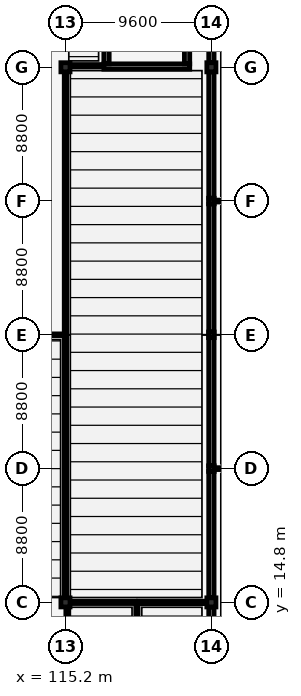
"""IFC4 building model, lengths in metres.
Left out: names, types, materials, properties, quantities, classifications, styles, units other than length and angle.
Written with IfcOpenShell. Run it as: python <this file> out.ifc"""

import sys

from ifc_helpers import new_model, si_unit, direction, frame, frame_2d, origin, origin_2d, place, context, subcontext, project, spatial, rectangle, i_section, extrude, element, fill, save


model = new_model("IFC4")
c1 = context("Model", 3, precision=1e-05, world=origin(), true_north=direction((0.0, 1.0)))
c2 = subcontext(c1, "Body", "Model", "MODEL_VIEW")
j1 = project(units=[si_unit("LENGTHUNIT", "METRE"), si_unit("PLANEANGLEUNIT", "RADIAN")], contexts=[c1])
p1 = place(None, origin())
s1 = spatial("IfcSite", under=j1, at=p1, CompositionType="ELEMENT")
p2 = place(p1, origin())
s2 = spatial("IfcBuilding", under=s1, at=p2, CompositionType="ELEMENT")
p3 = place(p2, origin())
s3 = spatial("IfcBuildingStorey", under=s2, at=p3, CompositionType="ELEMENT", Elevation=0.0)
for number, where, z_axis, x_axis in (
    (1, (115.2, 14.8, 0.0), (0.0, 0.0, 1.0), (1.0, 0.0, 0.0)),
    (2, (115.2, 50.0, 0.0), (0.0, 0.0, 1.0), (1.0, 0.0, 0.0)),
    (3, (124.8, 14.8, 0.0), (0.0, 0.0, 1.0), (1.0, 0.0, 0.0)),
):
    element("IfcColumn", number, at=place(p3, frame(where, z_axis=z_axis, x_axis=x_axis)), inside=s3, PredefinedType="COLUMN", context=c2, shape_type="SweptSolid", body=[
        extrude(rectangle(XDim=0.6, YDim=0.6, at=origin_2d()), origin(), (0.0, 0.0, 1.0), 4.8),
    ])
for number, where, z_axis, x_axis in (
    (4, (124.8, 23.6, 0.0), (0.0, 0.0, 1.0), (1.0, 0.0, 0.0)),
    (5, (124.8, 32.4, 0.0), (0.0, 0.0, 1.0), (1.0, 0.0, 0.0)),
    (6, (124.8, 41.2, 0.0), (0.0, 0.0, 1.0), (1.0, 0.0, 0.0)),
):
    element("IfcColumn", number, at=place(p3, frame(where, z_axis=z_axis, x_axis=x_axis)), inside=s3, PredefinedType="COLUMN", context=c2, shape_type="SweptSolid", body=[
        extrude(i_section(OverallWidth=0.368, OverallDepth=0.368, WebThickness=0.015, FlangeThickness=0.024, FilletRadius=0.025, at=origin_2d()), origin(), (0.0, 0.0, 1.0), 4.8),
    ])
p4 = place(p3, frame((124.8, 50.0, 0.0), z_axis=(0.0, 0.0, 1.0), x_axis=(1.0, 0.0, 0.0)))
e7 = element("IfcColumn", 7, at=p4, inside=s3, PredefinedType="COLUMN", context=c2, shape_type="SweptSolid", body=[
    extrude(rectangle(XDim=0.6, YDim=0.6, at=origin_2d()), origin(), (0.0, 0.0, 1.0), 4.8),
])
p5 = place(p3, frame((124.8, 6.4, 0.0), z_axis=(0.0, 0.0, 1.0), x_axis=(0.0, 1.0, 0.0)))
e8 = element("IfcWall", 8, at=p5, inside=s3, PredefinedType="SOLIDWALL", context=c2, shape_type="SweptSolid", body=[
    extrude(rectangle(XDim=8.1, YDim=0.35, at=frame_2d((4.05, 0.0))), origin(), (0.0, 0.0, 1.0), 4.1),
])
p6 = place(p3, frame((124.8, 15.1, 0.0), z_axis=(0.0, 0.0, 1.0), x_axis=(0.0, 1.0, 0.0)))
e9 = element("IfcWall", 9, at=p6, inside=s3, PredefinedType="SOLIDWALL", context=c2, shape_type="SweptSolid", body=[
    extrude(rectangle(XDim=8.316, YDim=0.35, at=frame_2d((4.158, 0.0))), origin(), (0.0, 0.0, 1.0), 4.1),
])
p7 = place(p6, frame((3.0, 0.0, 0.0)))
e10 = element("IfcOpeningElement", 10, at=p7, cuts=e9, PredefinedType="OPENING", context=c2, shape_type="SweptSolid", body=[
    extrude(rectangle(XDim=1.8, YDim=2.4, at=frame_2d((0.9, 1.2))), frame((0.0, 0.185, 0.0), z_axis=(0.0, -1.0, 0.0), x_axis=(1.0, 0.0, 0.0)), (0.0, 0.0, 1.0), 0.37),
])
p8 = place(p3, frame((124.8, 23.784, 0.0), z_axis=(0.0, 0.0, 1.0), x_axis=(0.0, 1.0, 0.0)))
e11 = element("IfcWall", 11, at=p8, inside=s3, PredefinedType="SOLIDWALL", context=c2, shape_type="SweptSolid", body=[
    extrude(rectangle(XDim=8.432, YDim=0.35, at=frame_2d((4.216, 0.0))), origin(), (0.0, 0.0, 1.0), 4.1),
])
p9 = place(p8, frame((3.0, 0.0, 0.0)))
e12 = element("IfcOpeningElement", 12, at=p9, cuts=e11, PredefinedType="OPENING", context=c2, shape_type="SweptSolid", body=[
    extrude(rectangle(XDim=1.76, YDim=2.37, at=frame_2d((0.88, 1.185))), frame((0.0, 0.185, 0.0), z_axis=(0.0, -1.0, 0.0), x_axis=(1.0, 0.0, 0.0)), (0.0, 0.0, 1.0), 0.37),
])
p10 = place(p3, frame((124.8, 32.584, 0.0), z_axis=(0.0, 0.0, 1.0), x_axis=(0.0, 1.0, 0.0)))
e13 = element("IfcWall", 13, at=p10, inside=s3, PredefinedType="SOLIDWALL", context=c2, shape_type="SweptSolid", body=[
    extrude(rectangle(XDim=8.432, YDim=0.35, at=frame_2d((4.216, 0.0))), origin(), (0.0, 0.0, 1.0), 4.1),
])
p11 = place(p10, frame((3.0, 0.0, 0.0)))
e14 = element("IfcOpeningElement", 14, at=p11, cuts=e13, PredefinedType="OPENING", context=c2, shape_type="SweptSolid", body=[
    extrude(rectangle(XDim=1.72, YDim=2.34, at=frame_2d((0.86, 1.17))), frame((0.0, 0.185, 0.0), z_axis=(0.0, -1.0, 0.0), x_axis=(1.0, 0.0, 0.0)), (0.0, 0.0, 1.0), 0.37),
])
p12 = place(p3, frame((124.8, 41.384, 0.0), z_axis=(0.0, 0.0, 1.0), x_axis=(0.0, 1.0, 0.0)))
e15 = element("IfcWall", 15, at=p12, inside=s3, PredefinedType="SOLIDWALL", context=c2, shape_type="SweptSolid", body=[
    extrude(rectangle(XDim=8.316, YDim=0.35, at=frame_2d((4.158, 0.0))), origin(), (0.0, 0.0, 1.0), 4.1),
])
p13 = place(p12, frame((3.0, 0.0, 0.0)))
e16 = element("IfcOpeningElement", 16, at=p13, cuts=e15, PredefinedType="OPENING", context=c2, shape_type="SweptSolid", body=[
    extrude(rectangle(XDim=1.68, YDim=2.31, at=frame_2d((0.84, 1.155))), frame((0.0, 0.185, 0.0), z_axis=(0.0, -1.0, 0.0), x_axis=(1.0, 0.0, 0.0)), (0.0, 0.0, 1.0), 0.37),
])
p14 = place(p3, frame((124.8, 50.3, 0.0), z_axis=(0.0, 0.0, 1.0), x_axis=(0.0, 1.0, 0.0)))
e17 = element("IfcWall", 17, at=p14, inside=s3, PredefinedType="SOLIDWALL", context=c2, shape_type="SweptSolid", body=[
    extrude(rectangle(XDim=8.1, YDim=0.35, at=frame_2d((4.05, 0.0))), origin(), (0.0, 0.0, 1.0), 4.1),
])
p15 = place(p3, frame((123.375, 50.05, 0.0), z_axis=(0.0, 0.0, 1.0), x_axis=(-1.0, 0.0, 0.0)))
e18 = element("IfcWall", 18, at=p15, inside=s3, PredefinedType="SHEAR", context=c2, shape_type="SweptSolid", body=[
    extrude(rectangle(XDim=5.65, YDim=0.35, at=frame_2d((2.825, 0.0))), origin(), (0.0, 0.0, 1.0), 4.55),
])
p16 = place(p3, frame((117.9, 50.225, 0.0), z_axis=(0.0, 0.0, 1.0), x_axis=(0.0, 1.0, 0.0)))
e19 = element("IfcWall", 19, at=p16, inside=s3, PredefinedType="SHEAR", context=c2, shape_type="SweptSolid", body=[
    extrude(rectangle(XDim=7.95, YDim=0.35, at=frame_2d((3.975, 0.0))), origin(), (0.0, 0.0, 1.0), 4.55),
])
p17 = place(p16, frame((0.22, 0.0, 0.0)))
e20 = element("IfcOpeningElement", 20, at=p17, cuts=e19, PredefinedType="OPENING", context=c2, shape_type="SweptSolid", body=[
    extrude(rectangle(XDim=2.05, YDim=2.15, at=frame_2d((1.025, 1.075))), frame((0.0, 0.185, 0.0), z_axis=(0.0, -1.0, 0.0), x_axis=(1.0, 0.0, 0.0)), (0.0, 0.0, 1.0), 0.37),
])
p18 = place(p3, frame((123.2, 58.175, 0.0), z_axis=(0.0, 0.0, 1.0), x_axis=(0.0, -1.0, 0.0)))
e21 = element("IfcWall", 21, at=p18, inside=s3, PredefinedType="SHEAR", context=c2, shape_type="SweptSolid", body=[
    extrude(rectangle(XDim=7.95, YDim=0.35, at=frame_2d((3.975, 0.0))), origin(), (0.0, 0.0, 1.0), 4.55),
])
p19 = place(p3, frame((86.5, 32.4, 0.0), z_axis=(0.0, 0.0, 1.0), x_axis=(1.0, 0.0, 0.0)))
e22 = element("IfcWall", 22, at=p19, inside=s3, PredefinedType="PARTITIONING", context=c2, shape_type="SweptSolid", body=[
    extrude(rectangle(XDim=28.65, YDim=0.125, at=frame_2d((14.325, 0.0))), origin(), (0.0, 0.0, 1.0), 4.42),
])
p20 = place(p3, frame((115.2, 14.9, 0.0), z_axis=(0.0, 0.0, 1.0), x_axis=(0.0, 1.0, 0.0)))
e23 = element("IfcWall", 23, at=p20, inside=s3, PredefinedType="PARTITIONING", context=c2, shape_type="SweptSolid", body=[
    extrude(rectangle(XDim=17.4, YDim=0.16, at=frame_2d((8.7, 0.0))), origin(), (0.0, 0.0, 1.0), 4.42),
])
p21 = place(p20, frame((7.8, 0.0, 0.0)))
e24 = element("IfcOpeningElement", 24, at=p21, cuts=e23, PredefinedType="OPENING", context=c2, shape_type="SweptSolid", body=[
    extrude(rectangle(XDim=1.8, YDim=2.15, at=frame_2d((0.9, 1.075))), frame((0.0, 0.09, 0.0), z_axis=(0.0, -1.0, 0.0), x_axis=(1.0, 0.0, 0.0)), (0.0, 0.0, 1.0), 0.18),
])
p22 = place(p3, frame((115.2, 32.5, 0.0), z_axis=(0.0, 0.0, 1.0), x_axis=(0.0, 1.0, 0.0)))
e25 = element("IfcWall", 25, at=p22, inside=s3, PredefinedType="PARTITIONING", context=c2, shape_type="SweptSolid", body=[
    extrude(rectangle(XDim=17.45, YDim=0.16, at=frame_2d((8.725, 0.0))), origin(), (0.0, 0.0, 1.0), 4.42),
])
p23 = place(p22, frame((7.825, 0.0, 0.0)))
e26 = element("IfcOpeningElement", 26, at=p23, cuts=e25, PredefinedType="OPENING", context=c2, shape_type="SweptSolid", body=[
    extrude(rectangle(XDim=1.8, YDim=2.15, at=frame_2d((0.9, 1.075))), frame((0.0, 0.09, 0.0), z_axis=(0.0, -1.0, 0.0), x_axis=(1.0, 0.0, 0.0)), (0.0, 0.0, 1.0), 0.18),
])
p24 = place(p3, frame((115.15, 50.1, 0.0), z_axis=(0.0, 0.0, 1.0), x_axis=(1.0, 0.0, 0.0)))
e27 = element("IfcWall", 27, at=p24, inside=s3, PredefinedType="PARTITIONING", context=c2, shape_type="SweptSolid", body=[
    extrude(rectangle(XDim=2.45, YDim=0.16, at=frame_2d((1.225, 0.0))), origin(), (0.0, 0.0, 1.0), 3.835),
])
p25 = place(p24, frame((0.43, 0.0, 0.0)))
e28 = element("IfcOpeningElement", 28, at=p25, cuts=e27, PredefinedType="OPENING", context=c2, shape_type="SweptSolid", body=[
    extrude(rectangle(XDim=1.8, YDim=2.15, at=frame_2d((0.9, 1.075))), frame((0.0, 0.09, 0.0), z_axis=(0.0, -1.0, 0.0), x_axis=(1.0, 0.0, 0.0)), (0.0, 0.0, 1.0), 0.18),
])
p26 = place(p3, frame((115.15, 14.8, 0.0), z_axis=(0.0, 0.0, 1.0), x_axis=(1.0, 0.0, 0.0)))
e29 = element("IfcWall", 29, at=p26, inside=s3, PredefinedType="PARTITIONING", context=c2, shape_type="SweptSolid", body=[
    extrude(rectangle(XDim=4.65, YDim=0.15, at=frame_2d((2.325, 0.0))), origin(), (0.0, 0.0, 1.0), 3.835),
])
p27 = place(p26, frame((1.85, 0.0, 0.0)))
e30 = element("IfcOpeningElement", 30, at=p27, cuts=e29, PredefinedType="OPENING", context=c2, shape_type="SweptSolid", body=[
    extrude(rectangle(XDim=0.95, YDim=2.15, at=frame_2d((0.475, 1.075))), frame((0.0, 0.085, 0.0), z_axis=(0.0, -1.0, 0.0), x_axis=(1.0, 0.0, 0.0)), (0.0, 0.0, 1.0), 0.17),
])
p28 = place(p3, frame((120.0, 14.8, 0.0), z_axis=(0.0, 0.0, 1.0), x_axis=(1.0, 0.0, 0.0)))
e31 = element("IfcWall", 31, at=p28, inside=s3, PredefinedType="PARTITIONING", context=c2, shape_type="SweptSolid", body=[
    extrude(rectangle(XDim=4.75, YDim=0.16, at=frame_2d((2.375, 0.0))), origin(), (0.0, 0.0, 1.0), 3.835),
])
p29 = place(p28, frame((1.475, 0.0, 0.0)))
e32 = element("IfcOpeningElement", 32, at=p29, cuts=e31, PredefinedType="OPENING", context=c2, shape_type="SweptSolid", body=[
    extrude(rectangle(XDim=1.8, YDim=2.15, at=frame_2d((0.9, 1.075))), frame((0.0, 0.09, 0.0), z_axis=(0.0, -1.0, 0.0), x_axis=(1.0, 0.0, 0.0)), (0.0, 0.0, 1.0), 0.18),
])
p30 = place(p3, frame((119.9, 10.7, 0.0), z_axis=(0.0, 0.0, 1.0), x_axis=(0.0, 1.0, 0.0)))
e33 = element("IfcWall", 33, at=p30, inside=s3, PredefinedType="PARTITIONING", context=c2, shape_type="SweptSolid", body=[
    extrude(rectangle(XDim=4.0, YDim=0.15, at=frame_2d((2.0, 0.0))), origin(), (0.0, 0.0, 1.0), 4.42),
])
p31 = place(p30, frame((1.525, 0.0, 0.0)))
e34 = element("IfcOpeningElement", 34, at=p31, cuts=e33, PredefinedType="OPENING", context=c2, shape_type="SweptSolid", body=[
    extrude(rectangle(XDim=0.95, YDim=2.15, at=frame_2d((0.475, 1.075))), frame((0.0, 0.085, 0.0), z_axis=(0.0, -1.0, 0.0), x_axis=(1.0, 0.0, 0.0)), (0.0, 0.0, 1.0), 0.17),
])
for number, where, z_axis, x_axis in (
    (35, (124.75, 23.6, 0.0), (0.0, 0.0, 1.0), (1.0, 0.0, 0.0)),
    (36, (124.75, 41.2, 0.0), (0.0, 0.0, 1.0), (1.0, 0.0, 0.0)),
):
    element("IfcWall", number, at=place(p3, frame(where, z_axis=z_axis, x_axis=x_axis)), inside=s3, PredefinedType="PARTITIONING", context=c2, shape_type="SweptSolid", body=[
        extrude(rectangle(XDim=10.4, YDim=0.125, at=frame_2d((5.2, 0.0))), origin(), (0.0, 0.0, 1.0), 3.835),
    ])
p32 = place(p3, frame((115.3, 10.84, 0.0), z_axis=(0.0, 0.0, 1.0), x_axis=(0.0, 1.0, 0.0)))
e37 = element("IfcWall", 37, at=p32, inside=s3, PredefinedType="PARTITIONING", context=c2, shape_type="SweptSolid", body=[
    extrude(rectangle(XDim=3.72, YDim=0.15, at=frame_2d((1.86, 0.0))), origin(), (0.0, 0.0, 1.0), 4.067),
])
p33 = place(p7, origin())
e38 = element("IfcDoor", 38, at=p33, inside=s3, OperationType="DOUBLE_DOOR_SINGLE_SWING", PredefinedType="DOOR", context=c2, shape_type="SweptSolid", body=[
    extrude(rectangle(XDim=1.8, YDim=2.4, at=frame_2d((0.9, 1.2))), frame((0.0, 0.025, 0.0), z_axis=(0.0, -1.0, 0.0), x_axis=(1.0, 0.0, 0.0)), (0.0, 0.0, 1.0), 0.05),
])
fill(e10, e38)
p34 = place(p9, origin())
e39 = element("IfcDoor", 39, at=p34, inside=s3, OperationType="DOUBLE_DOOR_SINGLE_SWING", PredefinedType="DOOR", context=c2, shape_type="SweptSolid", body=[
    extrude(rectangle(XDim=1.76, YDim=2.37, at=frame_2d((0.88, 1.185))), frame((0.0, 0.025, 0.0), z_axis=(0.0, -1.0, 0.0), x_axis=(1.0, 0.0, 0.0)), (0.0, 0.0, 1.0), 0.05),
])
fill(e12, e39)
p35 = place(p11, origin())
e40 = element("IfcDoor", 40, at=p35, inside=s3, OperationType="DOUBLE_DOOR_SINGLE_SWING", PredefinedType="DOOR", context=c2, shape_type="SweptSolid", body=[
    extrude(rectangle(XDim=1.72, YDim=2.34, at=frame_2d((0.86, 1.17))), frame((0.0, 0.025, 0.0), z_axis=(0.0, -1.0, 0.0), x_axis=(1.0, 0.0, 0.0)), (0.0, 0.0, 1.0), 0.05),
])
fill(e14, e40)
p36 = place(p13, origin())
e41 = element("IfcDoor", 41, at=p36, inside=s3, OperationType="DOUBLE_DOOR_SINGLE_SWING", PredefinedType="DOOR", context=c2, shape_type="SweptSolid", body=[
    extrude(rectangle(XDim=1.68, YDim=2.31, at=frame_2d((0.84, 1.155))), frame((0.0, 0.025, 0.0), z_axis=(0.0, -1.0, 0.0), x_axis=(1.0, 0.0, 0.0)), (0.0, 0.0, 1.0), 0.05),
])
fill(e16, e41)
p37 = place(p17, origin())
e42 = element("IfcDoor", 42, at=p37, inside=s3, OperationType="DOUBLE_DOOR_SINGLE_SWING", PredefinedType="DOOR", context=c2, shape_type="SweptSolid", body=[
    extrude(rectangle(XDim=2.05, YDim=2.15, at=frame_2d((1.025, 1.075))), frame((0.0, 0.025, 0.0), z_axis=(0.0, -1.0, 0.0), x_axis=(1.0, 0.0, 0.0)), (0.0, 0.0, 1.0), 0.05),
])
fill(e20, e42)
p38 = place(p21, origin())
e43 = element("IfcDoor", 43, at=p38, inside=s3, OperationType="DOUBLE_DOOR_SINGLE_SWING", PredefinedType="DOOR", context=c2, shape_type="SweptSolid", body=[
    extrude(rectangle(XDim=1.8, YDim=2.15, at=frame_2d((0.9, 1.075))), frame((0.0, 0.025, 0.0), z_axis=(0.0, -1.0, 0.0), x_axis=(1.0, 0.0, 0.0)), (0.0, 0.0, 1.0), 0.05),
])
fill(e24, e43)
p39 = place(p23, origin())
e44 = element("IfcDoor", 44, at=p39, inside=s3, OperationType="DOUBLE_DOOR_SINGLE_SWING", PredefinedType="DOOR", context=c2, shape_type="SweptSolid", body=[
    extrude(rectangle(XDim=1.8, YDim=2.15, at=frame_2d((0.9, 1.075))), frame((0.0, 0.025, 0.0), z_axis=(0.0, -1.0, 0.0), x_axis=(1.0, 0.0, 0.0)), (0.0, 0.0, 1.0), 0.05),
])
fill(e26, e44)
p40 = place(p25, origin())
e45 = element("IfcDoor", 45, at=p40, inside=s3, OperationType="DOUBLE_DOOR_SINGLE_SWING", PredefinedType="DOOR", context=c2, shape_type="SweptSolid", body=[
    extrude(rectangle(XDim=1.8, YDim=2.15, at=frame_2d((0.9, 1.075))), frame((0.0, 0.025, 0.0), z_axis=(0.0, -1.0, 0.0), x_axis=(1.0, 0.0, 0.0)), (0.0, 0.0, 1.0), 0.05),
])
fill(e28, e45)
p41 = place(p27, origin())
e46 = element("IfcDoor", 46, at=p41, inside=s3, OperationType="SINGLE_SWING_LEFT", PredefinedType="DOOR", context=c2, shape_type="SweptSolid", body=[
    extrude(rectangle(XDim=0.95, YDim=2.15, at=frame_2d((0.475, 1.075))), frame((0.0, 0.025, 0.0), z_axis=(0.0, -1.0, 0.0), x_axis=(1.0, 0.0, 0.0)), (0.0, 0.0, 1.0), 0.05),
])
fill(e30, e46)
p42 = place(p29, origin())
e47 = element("IfcDoor", 47, at=p42, inside=s3, OperationType="DOUBLE_DOOR_SINGLE_SWING", PredefinedType="DOOR", context=c2, shape_type="SweptSolid", body=[
    extrude(rectangle(XDim=1.8, YDim=2.15, at=frame_2d((0.9, 1.075))), frame((0.0, 0.025, 0.0), z_axis=(0.0, -1.0, 0.0), x_axis=(1.0, 0.0, 0.0)), (0.0, 0.0, 1.0), 0.05),
])
fill(e32, e47)
save(model, sys.argv[1])
